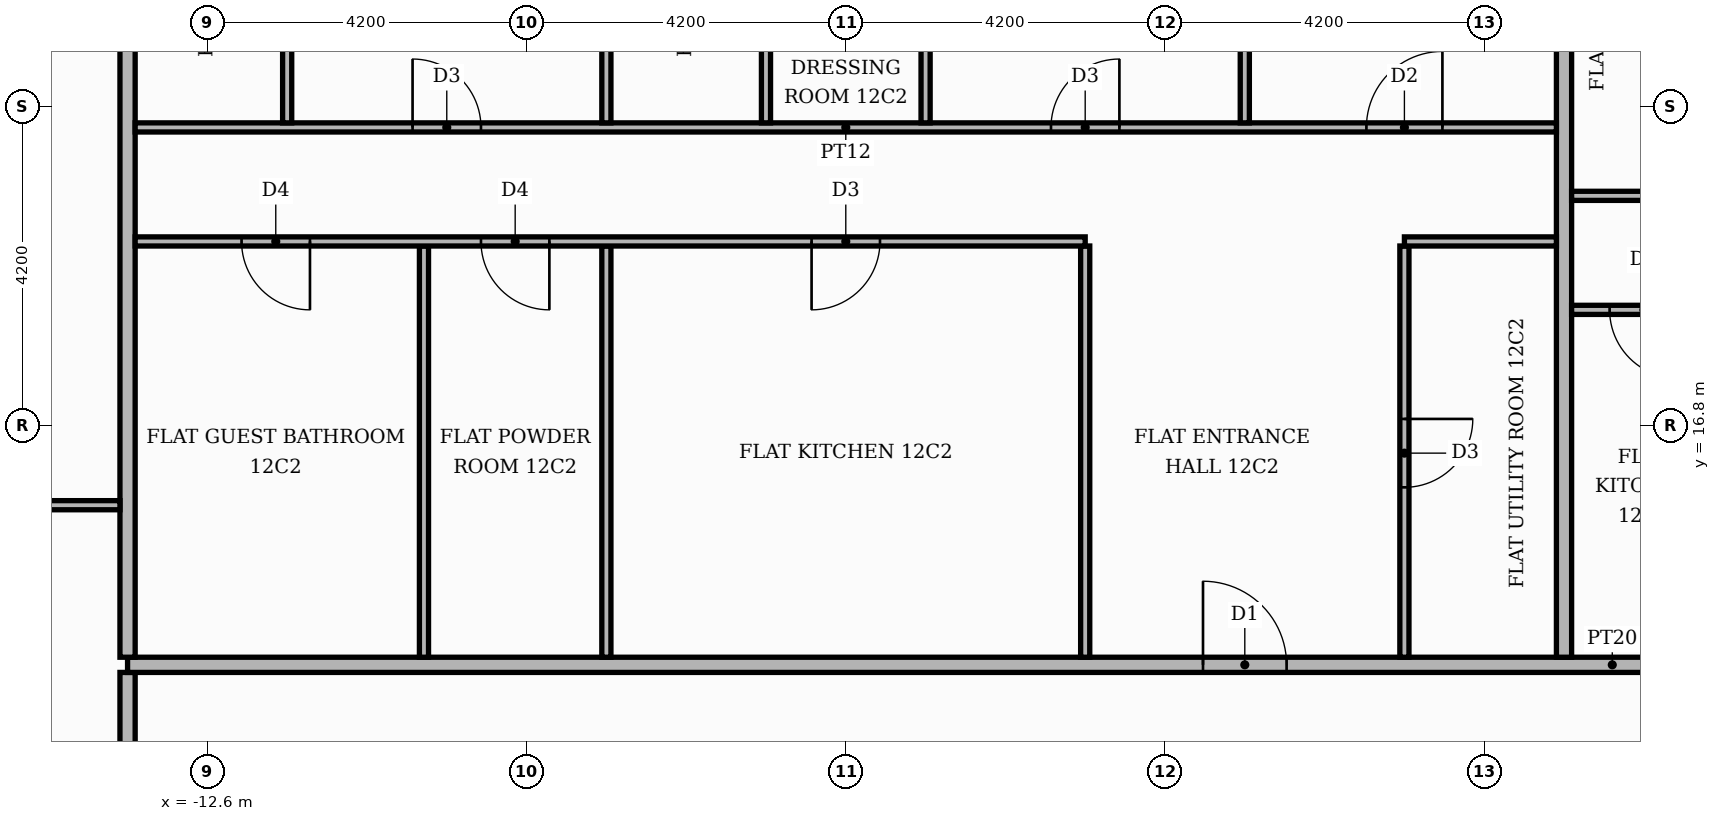
"""IFC4 building model, lengths in metres.
Left out: names, types, materials, properties, quantities, classifications, styles, units other than length and angle.
Written with IfcOpenShell. Run it as: python <this file> out.ifc"""

import sys

from ifc_helpers import new_model, si_unit, direction, frame, frame_2d, origin, place, context, subcontext, project, spatial, rectangle, extrude, element, fill, save


model = new_model("IFC4")
c1 = context("Model", 3, precision=1e-05, world=origin(), true_north=direction((0.0, 1.0)))
c2 = subcontext(c1, "Body", "Model", "MODEL_VIEW")
j1 = project(units=[si_unit("LENGTHUNIT", "METRE"), si_unit("PLANEANGLEUNIT", "RADIAN")], contexts=[c1])
p1 = place(None, origin())
s1 = spatial("IfcSite", under=j1, at=p1, CompositionType="ELEMENT")
p2 = place(p1, origin())
s2 = spatial("IfcBuilding", under=s1, at=p2, CompositionType="ELEMENT")
p3 = place(p2, frame((0.0, 0.0, 54.3)))
s3 = spatial("IfcBuildingStorey", under=s2, at=p3, CompositionType="ELEMENT", Elevation=54.3)
p4 = place(p3, frame((-13.65, 5.35, 0.0), z_axis=(0.0, 0.0, 1.0), x_axis=(0.0, 1.0, 0.0)))
e1 = element("IfcWall", 1, at=p4, inside=s3, PredefinedType="PARTITIONING", context=c2, shape_type="SweptSolid", body=[
    extrude(rectangle(XDim=8.2, YDim=0.2, at=frame_2d((4.1, 0.0))), origin(), (0.0, 0.0, 1.0), 3.48),
])
p5 = place(p4, frame((5.65, 0.0, 0.0)))
e2 = element("IfcOpeningElement", 2, at=p5, cuts=e1, PredefinedType="OPENING", context=c2, shape_type="SweptSolid", body=[
    extrude(rectangle(XDim=1.1, YDim=2.4, at=frame_2d((0.55, 1.2))), frame((0.0, 0.11, 0.0), z_axis=(0.0, -1.0, 0.0), x_axis=(1.0, 0.0, 0.0)), (0.0, 0.0, 1.0), 0.22),
])
p6 = place(p3, frame((-13.65, 13.65, 0.0), z_axis=(0.0, 0.0, 1.0), x_axis=(1.0, 0.0, 0.0)))
e3 = element("IfcWall", 3, at=p6, inside=s3, PredefinedType="PARTITIONING", context=c2, shape_type="SweptSolid", body=[
    extrude(rectangle(XDim=39.07, YDim=0.2, at=frame_2d((19.535, 0.0))), origin(), (0.0, 0.0, 1.0), 3.48),
])
p7 = place(p6, frame((24.65, 0.0, 0.0)))
e4 = element("IfcOpeningElement", 4, at=p7, cuts=e3, PredefinedType="OPENING", context=c2, shape_type="SweptSolid", body=[
    extrude(rectangle(XDim=1.1, YDim=2.4, at=frame_2d((0.55, 1.2))), frame((0.0, 0.11, 0.0), z_axis=(0.0, -1.0, 0.0), x_axis=(1.0, 0.0, 0.0)), (0.0, 0.0, 1.0), 0.22),
])
p8 = place(p6, frame((14.15, 0.0, 0.0)))
e5 = element("IfcOpeningElement", 5, at=p8, cuts=e3, PredefinedType="OPENING", context=c2, shape_type="SweptSolid", body=[
    extrude(rectangle(XDim=1.1, YDim=2.4, at=frame_2d((0.55, 1.2))), frame((0.0, 0.11, 0.0), z_axis=(0.0, -1.0, 0.0), x_axis=(1.0, 0.0, 0.0)), (0.0, 0.0, 1.0), 0.22),
])
p9 = place(p3, frame((-13.65, 13.75, 0.0), z_axis=(0.0, 0.0, 1.0), x_axis=(0.0, 1.0, 0.0)))
e6 = element("IfcWall", 6, at=p9, inside=s3, PredefinedType="PARTITIONING", context=c2, shape_type="SweptSolid", body=[
    extrude(rectangle(XDim=11.67, YDim=0.2, at=frame_2d((5.835, 0.0))), origin(), (0.0, 0.0, 1.0), 3.48),
])
for number, where, z_axis, x_axis in (
    (7, (-9.75, 13.75, 0.0), (0.0, 0.0, 1.0), (0.0, 1.0, 0.0)),
    (8, (-7.35, 13.75, 0.0), (0.0, 0.0, 1.0), (0.0, 1.0, 0.0)),
    (9, (-1.05, 13.75, 0.0), (0.0, 0.0, 1.0), (0.0, 1.0, 0.0)),
):
    element("IfcWall", number, at=place(p3, frame(where, z_axis=z_axis, x_axis=x_axis)), inside=s3, PredefinedType="PARTITIONING", context=c2, shape_type="SweptSolid", body=[
        extrude(rectangle(XDim=5.41, YDim=0.12, at=frame_2d((2.705, 0.0))), origin(), (0.0, 0.0, 1.0), 3.48),
    ])
p10 = place(p3, frame((3.15, 13.75, 0.0), z_axis=(0.0, 0.0, 1.0), x_axis=(0.0, 1.0, 0.0)))
e10 = element("IfcWall", 10, at=p10, inside=s3, PredefinedType="PARTITIONING", context=c2, shape_type="SweptSolid", body=[
    extrude(rectangle(XDim=5.41, YDim=0.12, at=frame_2d((2.705, 0.0))), origin(), (0.0, 0.0, 1.0), 3.48),
])
p11 = place(p10, frame((2.235, 0.0, 0.0)))
e11 = element("IfcOpeningElement", 11, at=p11, cuts=e10, PredefinedType="OPENING", context=c2, shape_type="SweptSolid", body=[
    extrude(rectangle(XDim=0.9, YDim=2.1, at=frame_2d((0.45, 1.05))), frame((0.0, 0.07, 0.0), z_axis=(0.0, -1.0, 0.0), x_axis=(1.0, 0.0, 0.0)), (0.0, 0.0, 1.0), 0.14),
])
p12 = place(p3, frame((5.25, 13.75, 0.0), z_axis=(0.0, 0.0, 1.0), x_axis=(0.0, 1.0, 0.0)))
e12 = element("IfcWall", 12, at=p12, inside=s3, PredefinedType="PARTITIONING", context=c2, shape_type="SweptSolid", body=[
    extrude(rectangle(XDim=11.67, YDim=0.2, at=frame_2d((5.835, 0.0))), origin(), (0.0, 0.0, 1.0), 3.48),
])
p13 = place(p3, frame((-19.82, 15.75, 0.0), z_axis=(0.0, 0.0, 1.0), x_axis=(1.0, 0.0, 0.0)))
e13 = element("IfcWall", 13, at=p13, inside=s3, PredefinedType="PARTITIONING", context=c2, shape_type="SweptSolid", body=[
    extrude(rectangle(XDim=6.07, YDim=0.12, at=frame_2d((3.035, 0.0))), origin(), (0.0, 0.0, 1.0), 3.48),
])
p14 = place(p13, frame((2.585, 0.0, 0.0)))
e14 = element("IfcOpeningElement", 14, at=p14, cuts=e13, PredefinedType="OPENING", context=c2, shape_type="SweptSolid", body=[
    extrude(rectangle(XDim=1.0, YDim=2.1, at=frame_2d((0.5, 1.05))), frame((0.0, 0.07, 0.0), z_axis=(0.0, -1.0, 0.0), x_axis=(1.0, 0.0, 0.0)), (0.0, 0.0, 1.0), 0.14),
])
p15 = place(p3, frame((5.35, 18.32, 0.0), z_axis=(0.0, 0.0, 1.0), x_axis=(1.0, 0.0, 0.0)))
e15 = element("IfcWall", 15, at=p15, inside=s3, PredefinedType="PARTITIONING", context=c2, shape_type="SweptSolid", body=[
    extrude(rectangle(XDim=4.1, YDim=0.12, at=frame_2d((2.05, 0.0))), origin(), (0.0, 0.0, 1.0), 3.48),
])
p16 = place(p15, frame((0.5, 0.0, 0.0)))
e16 = element("IfcOpeningElement", 16, at=p16, cuts=e15, PredefinedType="OPENING", context=c2, shape_type="SweptSolid", body=[
    extrude(rectangle(XDim=0.9, YDim=2.1, at=frame_2d((0.45, 1.05))), frame((0.0, 0.07, 0.0), z_axis=(0.0, -1.0, 0.0), x_axis=(1.0, 0.0, 0.0)), (0.0, 0.0, 1.0), 0.14),
])
p17 = place(p3, frame((-13.55, 19.22, 0.0), z_axis=(0.0, 0.0, 1.0), x_axis=(1.0, 0.0, 0.0)))
e17 = element("IfcWall", 17, at=p17, inside=s3, PredefinedType="PARTITIONING", context=c2, shape_type="SweptSolid", body=[
    extrude(rectangle(XDim=12.5, YDim=0.12, at=frame_2d((6.25, 0.0))), origin(), (0.0, 0.0, 1.0), 3.48),
])
p18 = place(p17, frame((8.9, 0.0, 0.0)))
e18 = element("IfcOpeningElement", 18, at=p18, cuts=e17, PredefinedType="OPENING", context=c2, shape_type="SweptSolid", body=[
    extrude(rectangle(XDim=0.9, YDim=2.1, at=frame_2d((0.45, 1.05))), frame((0.0, 0.07, 0.0), z_axis=(0.0, -1.0, 0.0), x_axis=(1.0, 0.0, 0.0)), (0.0, 0.0, 1.0), 0.14),
])
p19 = place(p17, frame((4.55, 0.0, 0.0)))
e19 = element("IfcOpeningElement", 19, at=p19, cuts=e17, PredefinedType="OPENING", context=c2, shape_type="SweptSolid", body=[
    extrude(rectangle(XDim=0.9, YDim=2.1, at=frame_2d((0.45, 1.05))), frame((0.0, 0.07, 0.0), z_axis=(0.0, -1.0, 0.0), x_axis=(1.0, 0.0, 0.0)), (0.0, 0.0, 1.0), 0.14),
])
p20 = place(p17, frame((1.4, 0.0, 0.0)))
e20 = element("IfcOpeningElement", 20, at=p20, cuts=e17, PredefinedType="OPENING", context=c2, shape_type="SweptSolid", body=[
    extrude(rectangle(XDim=0.9, YDim=2.1, at=frame_2d((0.45, 1.05))), frame((0.0, 0.07, 0.0), z_axis=(0.0, -1.0, 0.0), x_axis=(1.0, 0.0, 0.0)), (0.0, 0.0, 1.0), 0.14),
])
p21 = place(p3, frame((3.15, 19.22, 0.0), z_axis=(0.0, 0.0, 1.0), x_axis=(1.0, 0.0, 0.0)))
e21 = element("IfcWall", 21, at=p21, inside=s3, PredefinedType="PARTITIONING", context=c2, shape_type="SweptSolid", body=[
    extrude(rectangle(XDim=2.0, YDim=0.12, at=frame_2d((1.0, 0.0))), origin(), (0.0, 0.0, 1.0), 3.48),
])
p22 = place(p3, frame((5.35, 19.82, 0.0), z_axis=(0.0, 0.0, 1.0), x_axis=(1.0, 0.0, 0.0)))
e22 = element("IfcWall", 22, at=p22, inside=s3, PredefinedType="PARTITIONING", context=c2, shape_type="SweptSolid", body=[
    extrude(rectangle(XDim=11.95, YDim=0.12, at=frame_2d((5.975, 0.0))), origin(), (0.0, 0.0, 1.0), 3.48),
])
p23 = place(p22, frame((8.85, 0.0, 0.0)))
e23 = element("IfcOpeningElement", 23, at=p23, cuts=e22, PredefinedType="OPENING", context=c2, shape_type="SweptSolid", body=[
    extrude(rectangle(XDim=1.0, YDim=2.1, at=frame_2d((0.5, 1.05))), frame((0.0, 0.07, 0.0), z_axis=(0.0, -1.0, 0.0), x_axis=(1.0, 0.0, 0.0)), (0.0, 0.0, 1.0), 0.14),
])
p24 = place(p22, frame((5.75, 0.0, 0.0)))
e24 = element("IfcOpeningElement", 24, at=p24, cuts=e22, PredefinedType="OPENING", context=c2, shape_type="SweptSolid", body=[
    extrude(rectangle(XDim=0.9, YDim=2.1, at=frame_2d((0.45, 1.05))), frame((0.0, 0.07, 0.0), z_axis=(0.0, -1.0, 0.0), x_axis=(1.0, 0.0, 0.0)), (0.0, 0.0, 1.0), 0.14),
])
p25 = place(p3, frame((-13.55, 20.72, 0.0), z_axis=(0.0, 0.0, 1.0), x_axis=(1.0, 0.0, 0.0)))
e25 = element("IfcWall", 25, at=p25, inside=s3, PredefinedType="PARTITIONING", context=c2, shape_type="SweptSolid", body=[
    extrude(rectangle(XDim=18.7, YDim=0.12, at=frame_2d((9.35, 0.0))), origin(), (0.0, 0.0, 1.0), 3.48),
])
p26 = place(p25, frame((16.2, 0.0, 0.0)))
e26 = element("IfcOpeningElement", 26, at=p26, cuts=e25, PredefinedType="OPENING", context=c2, shape_type="SweptSolid", body=[
    extrude(rectangle(XDim=1.0, YDim=2.1, at=frame_2d((0.5, 1.05))), frame((0.0, 0.07, 0.0), z_axis=(0.0, -1.0, 0.0), x_axis=(1.0, 0.0, 0.0)), (0.0, 0.0, 1.0), 0.14),
])
p27 = place(p25, frame((12.05, 0.0, 0.0)))
e27 = element("IfcOpeningElement", 27, at=p27, cuts=e25, PredefinedType="OPENING", context=c2, shape_type="SweptSolid", body=[
    extrude(rectangle(XDim=0.9, YDim=2.1, at=frame_2d((0.45, 1.05))), frame((0.0, 0.07, 0.0), z_axis=(0.0, -1.0, 0.0), x_axis=(1.0, 0.0, 0.0)), (0.0, 0.0, 1.0), 0.14),
])
p28 = place(p25, frame((3.65, 0.0, 0.0)))
e28 = element("IfcOpeningElement", 28, at=p28, cuts=e25, PredefinedType="OPENING", context=c2, shape_type="SweptSolid", body=[
    extrude(rectangle(XDim=0.9, YDim=2.1, at=frame_2d((0.45, 1.05))), frame((0.0, 0.07, 0.0), z_axis=(0.0, -1.0, 0.0), x_axis=(1.0, 0.0, 0.0)), (0.0, 0.0, 1.0), 0.14),
])
p29 = place(p3, frame((-11.55, 20.78, 0.0), z_axis=(0.0, 0.0, 1.0), x_axis=(0.0, 1.0, 0.0)))
e29 = element("IfcWall", 29, at=p29, inside=s3, PredefinedType="PARTITIONING", context=c2, shape_type="SweptSolid", body=[
    extrude(rectangle(XDim=4.64, YDim=0.12, at=frame_2d((2.32, 0.0))), origin(), (0.0, 0.0, 1.0), 3.48),
])
p30 = place(p29, frame((1.99, 0.0, 0.0)))
e30 = element("IfcOpeningElement", 30, at=p30, cuts=e29, PredefinedType="OPENING", context=c2, shape_type="SweptSolid", body=[
    extrude(rectangle(XDim=0.9, YDim=2.1, at=frame_2d((0.45, 1.05))), frame((0.0, 0.07, 0.0), z_axis=(0.0, -1.0, 0.0), x_axis=(1.0, 0.0, 0.0)), (0.0, 0.0, 1.0), 0.14),
])
p31 = place(p3, frame((-7.35, 20.78, 0.0), z_axis=(0.0, 0.0, 1.0), x_axis=(0.0, 1.0, 0.0)))
e31 = element("IfcWall", 31, at=p31, inside=s3, PredefinedType="PARTITIONING", context=c2, shape_type="SweptSolid", body=[
    extrude(rectangle(XDim=4.64, YDim=0.12, at=frame_2d((2.32, 0.0))), origin(), (0.0, 0.0, 1.0), 3.48),
])
p32 = place(p3, frame((-5.25, 20.78, 0.0), z_axis=(0.0, 0.0, 1.0), x_axis=(0.0, 1.0, 0.0)))
e32 = element("IfcWall", 32, at=p32, inside=s3, PredefinedType="PARTITIONING", context=c2, shape_type="SweptSolid", body=[
    extrude(rectangle(XDim=4.64, YDim=0.12, at=frame_2d((2.32, 0.0))), origin(), (0.0, 0.0, 1.0), 3.48),
])
p33 = place(p32, frame((1.99, 0.0, 0.0)))
e33 = element("IfcOpeningElement", 33, at=p33, cuts=e32, PredefinedType="OPENING", context=c2, shape_type="SweptSolid", body=[
    extrude(rectangle(XDim=0.9, YDim=2.1, at=frame_2d((0.45, 1.05))), frame((0.0, 0.07, 0.0), z_axis=(0.0, -1.0, 0.0), x_axis=(1.0, 0.0, 0.0)), (0.0, 0.0, 1.0), 0.14),
])
p34 = place(p3, frame((-3.15, 20.78, 0.0), z_axis=(0.0, 0.0, 1.0), x_axis=(0.0, 1.0, 0.0)))
e34 = element("IfcWall", 34, at=p34, inside=s3, PredefinedType="PARTITIONING", context=c2, shape_type="SweptSolid", body=[
    extrude(rectangle(XDim=4.64, YDim=0.12, at=frame_2d((2.32, 0.0))), origin(), (0.0, 0.0, 1.0), 3.48),
])
p35 = place(p34, frame((1.99, 0.0, 0.0)))
e35 = element("IfcOpeningElement", 35, at=p35, cuts=e34, PredefinedType="OPENING", context=c2, shape_type="SweptSolid", body=[
    extrude(rectangle(XDim=0.9, YDim=2.1, at=frame_2d((0.45, 1.05))), frame((0.0, 0.07, 0.0), z_axis=(0.0, -1.0, 0.0), x_axis=(1.0, 0.0, 0.0)), (0.0, 0.0, 1.0), 0.14),
])
p36 = place(p3, frame((1.05, 20.78, 0.0), z_axis=(0.0, 0.0, 1.0), x_axis=(0.0, 1.0, 0.0)))
e36 = element("IfcWall", 36, at=p36, inside=s3, PredefinedType="PARTITIONING", context=c2, shape_type="SweptSolid", body=[
    extrude(rectangle(XDim=4.64, YDim=0.12, at=frame_2d((2.32, 0.0))), origin(), (0.0, 0.0, 1.0), 3.48),
])
p37 = place(p16, frame((0.9, 0.0, 0.0), z_axis=(0.0, 0.0, 1.0), x_axis=(-1.0, 0.0, 0.0)))
e37 = element("IfcDoor", 37, at=p37, inside=s3, OperationType="SINGLE_SWING_RIGHT", PredefinedType="DOOR", context=c2, shape_type="SweptSolid", body=[
    extrude(rectangle(XDim=0.9, YDim=2.1, at=frame_2d((0.45, 1.05))), frame((0.0, 0.025, 0.0), z_axis=(0.0, -1.0, 0.0), x_axis=(1.0, 0.0, 0.0)), (0.0, 0.0, 1.0), 0.05),
])
fill(e16, e37)
p38 = place(p8, origin())
e38 = element("IfcDoor", 38, at=p38, inside=s3, OperationType="SINGLE_SWING_LEFT", PredefinedType="DOOR", context=c2, shape_type="SweptSolid", body=[
    extrude(rectangle(XDim=1.1, YDim=2.4, at=frame_2d((0.55, 1.2))), frame((0.0, 0.025, 0.0), z_axis=(0.0, -1.0, 0.0), x_axis=(1.0, 0.0, 0.0)), (0.0, 0.0, 1.0), 0.05),
])
fill(e5, e38)
p39 = place(p11, frame((0.9, 0.0, 0.0), z_axis=(0.0, 0.0, 1.0), x_axis=(-1.0, 0.0, 0.0)))
e39 = element("IfcDoor", 39, at=p39, inside=s3, OperationType="SINGLE_SWING_RIGHT", PredefinedType="DOOR", context=c2, shape_type="SweptSolid", body=[
    extrude(rectangle(XDim=0.9, YDim=2.1, at=frame_2d((0.45, 1.05))), frame((0.0, 0.025, 0.0), z_axis=(0.0, -1.0, 0.0), x_axis=(1.0, 0.0, 0.0)), (0.0, 0.0, 1.0), 0.05),
])
fill(e11, e39)
p40 = place(p18, frame((0.9, 0.0, 0.0), z_axis=(0.0, 0.0, 1.0), x_axis=(-1.0, 0.0, 0.0)))
e40 = element("IfcDoor", 40, at=p40, inside=s3, OperationType="SINGLE_SWING_LEFT", PredefinedType="DOOR", context=c2, shape_type="SweptSolid", body=[
    extrude(rectangle(XDim=0.9, YDim=2.1, at=frame_2d((0.45, 1.05))), frame((0.0, 0.025, 0.0), z_axis=(0.0, -1.0, 0.0), x_axis=(1.0, 0.0, 0.0)), (0.0, 0.0, 1.0), 0.05),
])
fill(e18, e40)
p41 = place(p19, frame((0.9, 0.0, 0.0), z_axis=(0.0, 0.0, 1.0), x_axis=(-1.0, 0.0, 0.0)))
e41 = element("IfcDoor", 41, at=p41, inside=s3, OperationType="SINGLE_SWING_RIGHT", PredefinedType="DOOR", context=c2, shape_type="SweptSolid", body=[
    extrude(rectangle(XDim=0.9, YDim=2.1, at=frame_2d((0.45, 1.05))), frame((0.0, 0.025, 0.0), z_axis=(0.0, -1.0, 0.0), x_axis=(1.0, 0.0, 0.0)), (0.0, 0.0, 1.0), 0.05),
])
fill(e19, e41)
p42 = place(p20, frame((0.9, 0.0, 0.0), z_axis=(0.0, 0.0, 1.0), x_axis=(-1.0, 0.0, 0.0)))
e42 = element("IfcDoor", 42, at=p42, inside=s3, OperationType="SINGLE_SWING_RIGHT", PredefinedType="DOOR", context=c2, shape_type="SweptSolid", body=[
    extrude(rectangle(XDim=0.9, YDim=2.1, at=frame_2d((0.45, 1.05))), frame((0.0, 0.025, 0.0), z_axis=(0.0, -1.0, 0.0), x_axis=(1.0, 0.0, 0.0)), (0.0, 0.0, 1.0), 0.05),
])
fill(e20, e42)
p43 = place(p26, origin())
e43 = element("IfcDoor", 43, at=p43, inside=s3, OperationType="SINGLE_SWING_RIGHT", PredefinedType="DOOR", context=c2, shape_type="SweptSolid", body=[
    extrude(rectangle(XDim=1.0, YDim=2.1, at=frame_2d((0.5, 1.05))), frame((0.0, 0.025, 0.0), z_axis=(0.0, -1.0, 0.0), x_axis=(1.0, 0.0, 0.0)), (0.0, 0.0, 1.0), 0.05),
])
fill(e26, e43)
p44 = place(p27, origin())
e44 = element("IfcDoor", 44, at=p44, inside=s3, OperationType="SINGLE_SWING_RIGHT", PredefinedType="DOOR", context=c2, shape_type="SweptSolid", body=[
    extrude(rectangle(XDim=0.9, YDim=2.1, at=frame_2d((0.45, 1.05))), frame((0.0, 0.025, 0.0), z_axis=(0.0, -1.0, 0.0), x_axis=(1.0, 0.0, 0.0)), (0.0, 0.0, 1.0), 0.05),
])
fill(e27, e44)
p45 = place(p28, origin())
e45 = element("IfcDoor", 45, at=p45, inside=s3, OperationType="SINGLE_SWING_LEFT", PredefinedType="DOOR", context=c2, shape_type="SweptSolid", body=[
    extrude(rectangle(XDim=0.9, YDim=2.1, at=frame_2d((0.45, 1.05))), frame((0.0, 0.025, 0.0), z_axis=(0.0, -1.0, 0.0), x_axis=(1.0, 0.0, 0.0)), (0.0, 0.0, 1.0), 0.05),
])
fill(e28, e45)
save(model, sys.argv[1])
